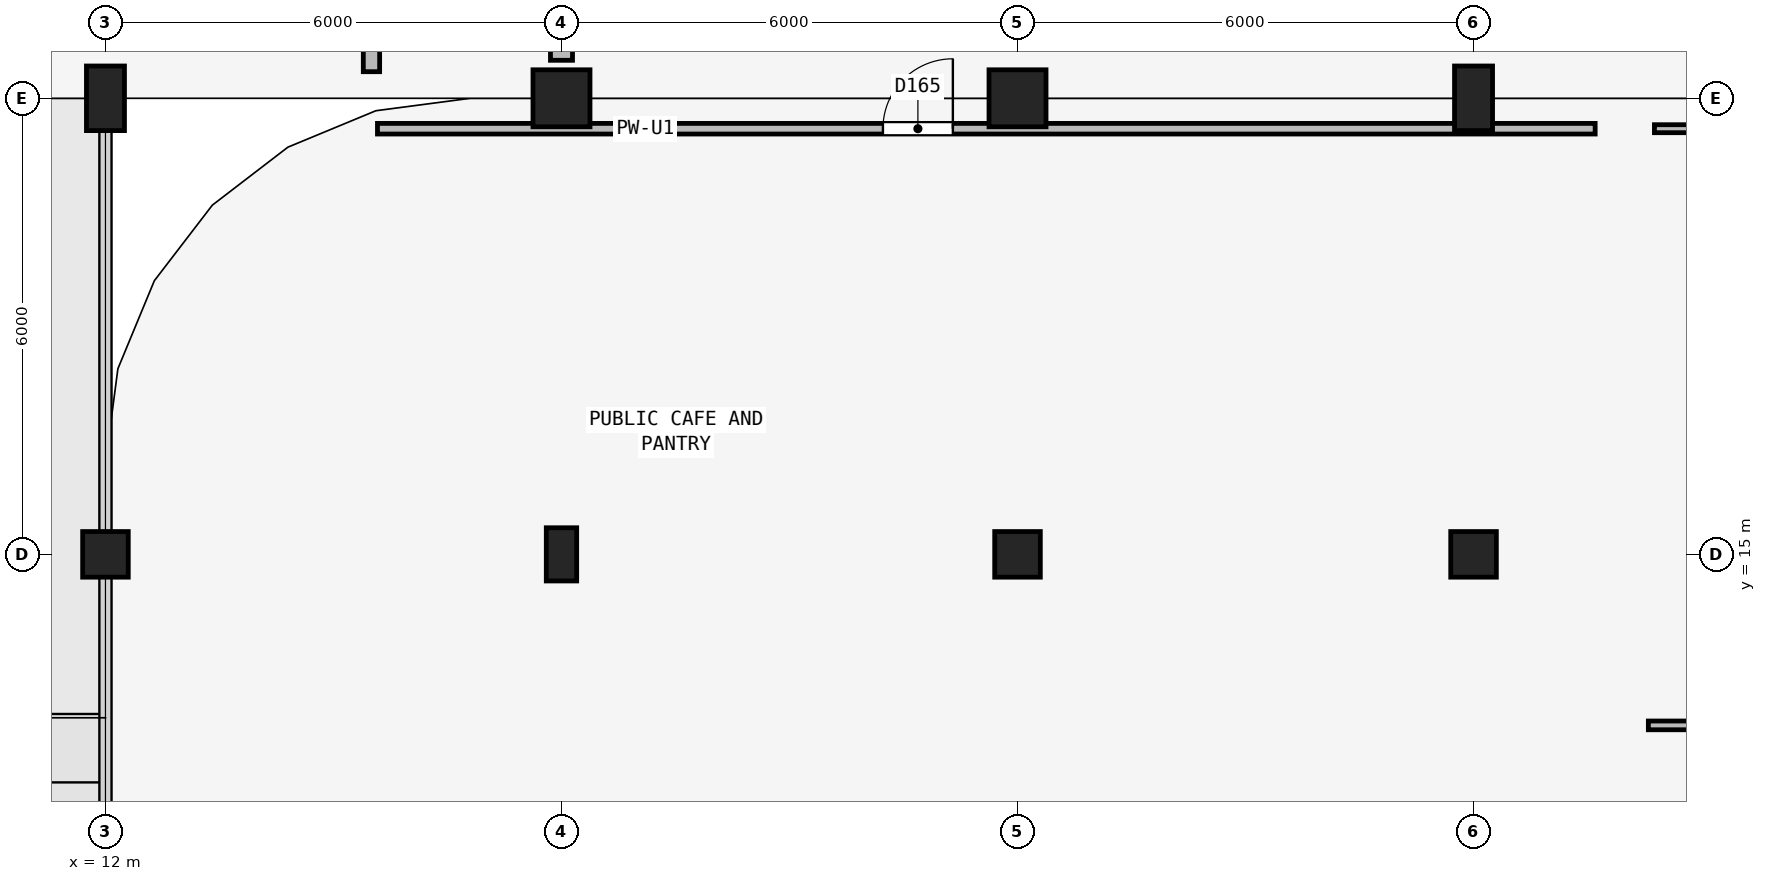
"""IFC4 building model, lengths in metres.
Left out: names, types, materials, properties, quantities, classifications, styles, units other than length and angle.
Written with IfcOpenShell. Run it as: python <this file> out.ifc"""

import sys

from ifc_helpers import new_model, si_unit, direction, frame, frame_2d, origin, origin_2d, place, context, subcontext, project, spatial, rectangle, extrude, element, fill, save


model = new_model("IFC4")
c1 = context("Model", 3, precision=1e-05, world=origin(), true_north=direction((0.0, 1.0)))
c2 = subcontext(c1, "Body", "Model", "MODEL_VIEW")
j1 = project(units=[si_unit("LENGTHUNIT", "METRE"), si_unit("PLANEANGLEUNIT", "RADIAN")], contexts=[c1])
p1 = place(None, origin())
s1 = spatial("IfcSite", under=j1, at=p1, CompositionType="ELEMENT")
p2 = place(p1, origin())
s2 = spatial("IfcBuilding", under=s1, at=p2, CompositionType="ELEMENT")
p3 = place(p2, origin())
s3 = spatial("IfcBuildingStorey", under=s2, at=p3, CompositionType="ELEMENT", Elevation=0.0)
p4 = place(p3, frame((12.0, 15.0, 0.0), z_axis=(0.0, 0.0, 1.0), x_axis=(1.0, 0.0, 0.0)))
e1 = element("IfcColumn", 1, at=p4, inside=s3, PredefinedType="COLUMN", context=c2, shape_type="SweptSolid", body=[
    extrude(rectangle(XDim=0.6, YDim=0.6, at=origin_2d()), origin(), (0.0, 0.0, 1.0), 4.8),
])
p5 = place(p3, frame((12.0, 21.0, 0.0), z_axis=(0.0, 0.0, 1.0), x_axis=(1.0, 0.0, 0.0)))
e2 = element("IfcColumn", 2, at=p5, inside=s3, PredefinedType="COLUMN", context=c2, shape_type="SweptSolid", body=[
    extrude(rectangle(XDim=0.5, YDim=0.85, at=origin_2d()), origin(), (0.0, 0.0, 1.0), 4.8),
])
p6 = place(p3, frame((18.0, 15.0, 0.0), z_axis=(0.0, 0.0, 1.0), x_axis=(1.0, 0.0, 0.0)))
e3 = element("IfcColumn", 3, at=p6, inside=s3, PredefinedType="COLUMN", context=c2, shape_type="SweptSolid", body=[
    extrude(rectangle(XDim=0.4, YDim=0.7, at=origin_2d()), origin(), (0.0, 0.0, 1.0), 4.8),
])
p7 = place(p3, frame((18.0, 21.0, 0.0), z_axis=(0.0, 0.0, 1.0), x_axis=(1.0, 0.0, 0.0)))
e4 = element("IfcColumn", 4, at=p7, inside=s3, PredefinedType="COLUMN", context=c2, shape_type="SweptSolid", body=[
    extrude(rectangle(XDim=0.75, YDim=0.75, at=origin_2d()), origin(), (0.0, 0.0, 1.0), 4.8),
])
p8 = place(p3, frame((24.0, 15.0, 0.0), z_axis=(0.0, 0.0, 1.0), x_axis=(1.0, 0.0, 0.0)))
e5 = element("IfcColumn", 5, at=p8, inside=s3, PredefinedType="COLUMN", context=c2, shape_type="SweptSolid", body=[
    extrude(rectangle(XDim=0.6, YDim=0.6, at=origin_2d()), origin(), (0.0, 0.0, 1.0), 4.8),
])
p9 = place(p3, frame((24.0, 21.0, 0.0), z_axis=(0.0, 0.0, 1.0), x_axis=(1.0, 0.0, 0.0)))
e6 = element("IfcColumn", 6, at=p9, inside=s3, PredefinedType="COLUMN", context=c2, shape_type="SweptSolid", body=[
    extrude(rectangle(XDim=0.75, YDim=0.75, at=origin_2d()), origin(), (0.0, 0.0, 1.0), 4.8),
])
p10 = place(p3, frame((30.0, 15.0, 0.0), z_axis=(0.0, 0.0, 1.0), x_axis=(1.0, 0.0, 0.0)))
e7 = element("IfcColumn", 7, at=p10, inside=s3, PredefinedType="COLUMN", context=c2, shape_type="SweptSolid", body=[
    extrude(rectangle(XDim=0.6, YDim=0.6, at=origin_2d()), origin(), (0.0, 0.0, 1.0), 4.8),
])
p11 = place(p3, frame((30.0, 21.0, 0.0), z_axis=(0.0, 0.0, 1.0), x_axis=(1.0, 0.0, 0.0)))
e8 = element("IfcColumn", 8, at=p11, inside=s3, PredefinedType="COLUMN", context=c2, shape_type="SweptSolid", body=[
    extrude(rectangle(XDim=0.5, YDim=0.85, at=origin_2d()), origin(), (0.0, 0.0, 1.0), 4.8),
])
p12 = place(p3, frame((15.5, 21.35, 0.0), z_axis=(0.0, 0.0, 1.0), x_axis=(0.0, 1.0, 0.0)))
e9 = element("IfcWall", 9, at=p12, inside=s3, PredefinedType="PARTITIONING", context=c2, shape_type="SweptSolid", body=[
    extrude(rectangle(XDim=5.05, YDim=0.215, at=frame_2d((2.525, 0.0))), origin(), (0.0, 0.0, 1.0), 3.49),
])
p13 = place(p3, frame((15.579, 20.6, 0.0), z_axis=(0.0, 0.0, 1.0), x_axis=(1.0, 0.0, 0.0)))
e10 = element("IfcWall", 10, at=p13, inside=s3, PredefinedType="PARTITIONING", context=c2, shape_type="SweptSolid", body=[
    extrude(rectangle(XDim=16.021, YDim=0.14, at=frame_2d((8.011, 0.0))), origin(), (0.0, 0.0, 1.0), 4.083),
])
p14 = place(p13, frame((6.65, 0.0, 0.0)))
e11 = element("IfcOpeningElement", 11, at=p14, cuts=e10, PredefinedType="OPENING", context=c2, shape_type="SweptSolid", body=[
    extrude(rectangle(XDim=0.92, YDim=2.1, at=frame_2d((0.46, 1.05))), frame((0.0, 0.08, 0.0), z_axis=(0.0, -1.0, 0.0), x_axis=(1.0, 0.0, 0.0)), (0.0, 0.0, 1.0), 0.16),
])
p15 = place(p3, frame((43.05, 12.75, 0.0), z_axis=(0.0, 0.0, 1.0), x_axis=(-1.0, 0.0, 0.0)))
e12 = element("IfcWall", 12, at=p15, inside=s3, PredefinedType="PARTITIONING", context=c2, shape_type="SweptSolid", body=[
    extrude(rectangle(XDim=10.75, YDim=0.115, at=frame_2d((5.375, 0.0))), origin(), (0.0, 0.0, 1.0), 4.09),
])
p16 = place(p15, frame((4.875, 0.0, 0.0)))
e13 = element("IfcOpeningElement", 13, at=p16, cuts=e12, PredefinedType="OPENING", context=c2, shape_type="SweptSolid", body=[
    extrude(rectangle(XDim=1.0, YDim=2.15, at=frame_2d((0.5, 1.075))), frame((0.0, 0.067, 0.0), z_axis=(0.0, -1.0, 0.0), x_axis=(1.0, 0.0, 0.0)), (0.0, 0.0, 1.0), 0.135),
])
p17 = place(p15, frame((6.525, 0.0, 0.95)))
e14 = element("IfcOpeningElement", 14, at=p17, cuts=e12, PredefinedType="OPENING", context=c2, shape_type="SweptSolid", body=[
    extrude(rectangle(XDim=3.0, YDim=1.3, at=frame_2d((1.5, 0.65))), frame((0.0, 0.067, 0.0), z_axis=(0.0, -1.0, 0.0), x_axis=(1.0, 0.0, 0.0)), (0.0, 0.0, 1.0), 0.135),
])
p18 = place(p3, frame((18.0, 21.5, 0.0), z_axis=(0.0, 0.0, 1.0), x_axis=(0.0, 1.0, 0.0)))
e15 = element("IfcWall", 15, at=p18, inside=s3, PredefinedType="PARTITIONING", context=c2, shape_type="SweptSolid", body=[
    extrude(rectangle(XDim=8.3, YDim=0.29, at=frame_2d((4.15, 0.0))), origin(), (0.0, 0.0, 1.0), 3.94),
])
p19 = place(p18, frame((3.5, 0.0, 0.0)))
e16 = element("IfcOpeningElement", 16, at=p19, cuts=e15, PredefinedType="OPENING", context=c2, shape_type="SweptSolid", body=[
    extrude(rectangle(XDim=1.3, YDim=2.2, at=frame_2d((0.65, 1.1))), frame((0.0, 0.155, 0.0), z_axis=(0.0, -1.0, 0.0), x_axis=(1.0, 0.0, 0.0)), (0.0, 0.0, 1.0), 0.31),
])
p20 = place(p3, frame((32.38, 20.6, 0.0), z_axis=(0.0, 0.0, 1.0), x_axis=(1.0, 0.0, 0.0)))
e17 = element("IfcWall", 17, at=p20, inside=s3, PredefinedType="PARTITIONING", context=c2, shape_type="SweptSolid", body=[
    extrude(rectangle(XDim=10.59, YDim=0.105, at=frame_2d((5.295, 0.0))), origin(), (0.0, 0.0, 1.0), 4.083),
])
p21 = place(p14, origin())
e18 = element("IfcDoor", 18, at=p21, inside=s3, OperationType="SINGLE_SWING_RIGHT", PredefinedType="DOOR", context=c2, shape_type="SweptSolid", body=[
    extrude(rectangle(XDim=0.92, YDim=2.1, at=frame_2d((0.46, 1.05))), frame((0.0, 0.025, 0.0), z_axis=(0.0, -1.0, 0.0), x_axis=(1.0, 0.0, 0.0)), (0.0, 0.0, 1.0), 0.05),
])
fill(e11, e18)
save(model, sys.argv[1])
